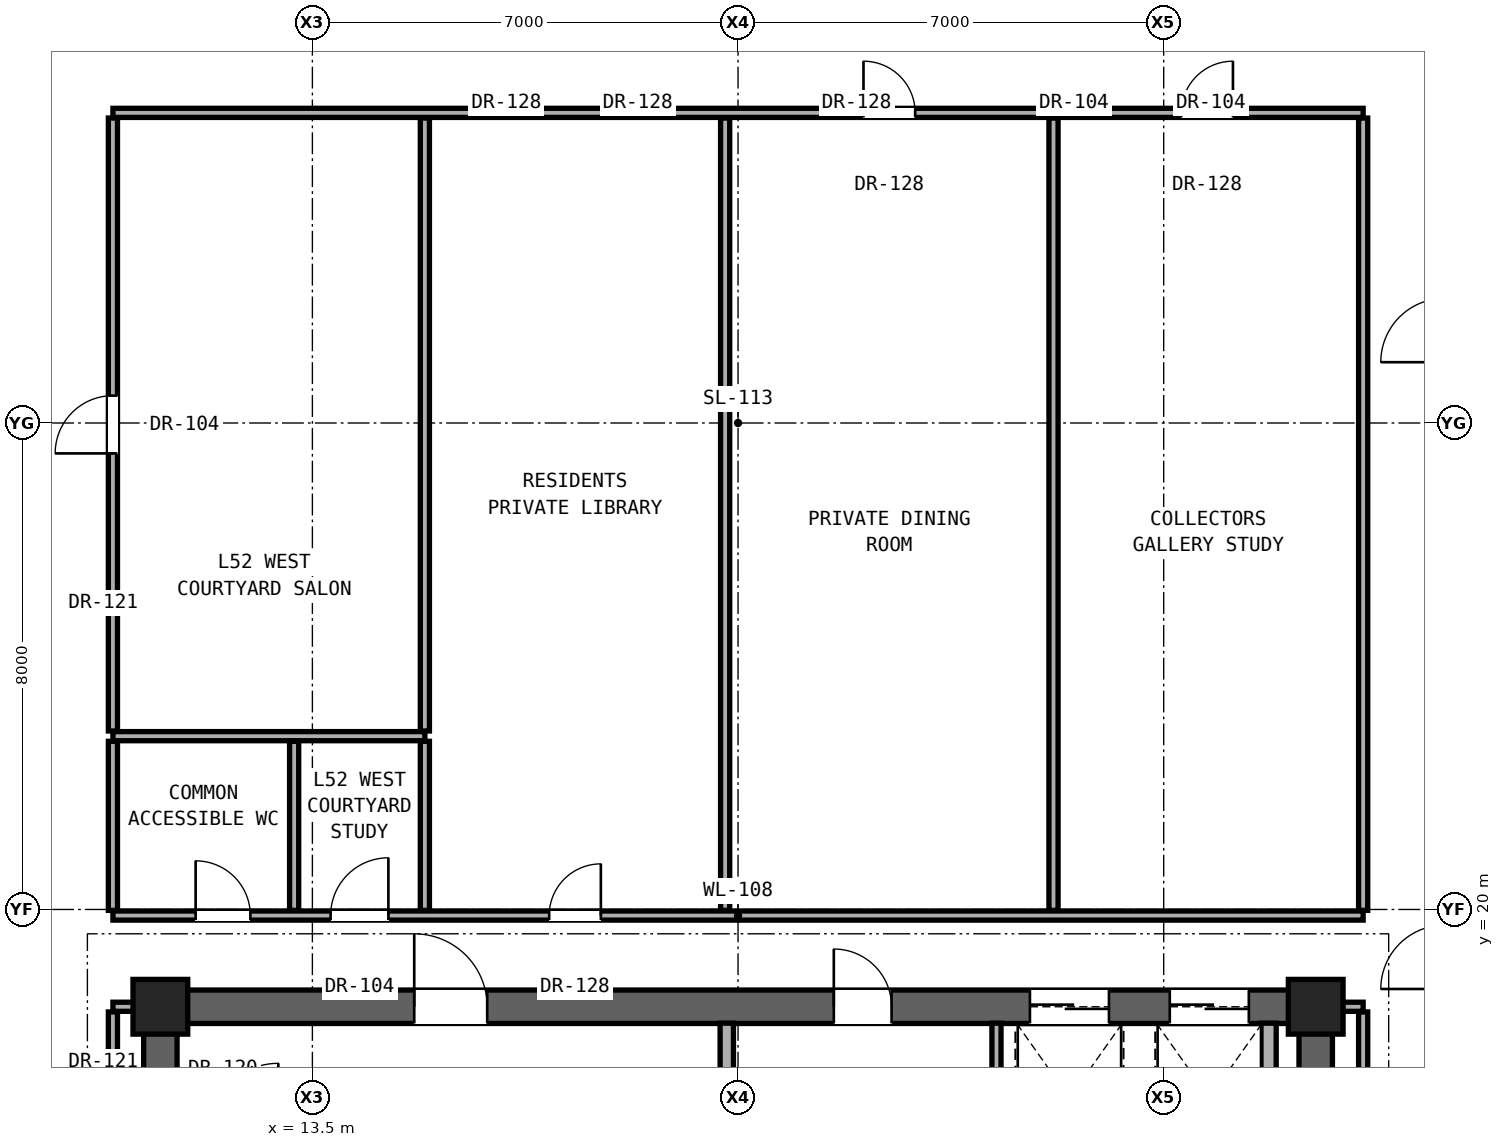
"""IFC4 building model, lengths in metres.
Left out: names, types, materials, properties, quantities, classifications, styles, units other than length and angle.
Written with IfcOpenShell. Run it as: python <this file> out.ifc"""

import sys

from ifc_helpers import new_model, si_unit, direction, frame, frame_2d, origin, origin_2d, place, context, subcontext, project, spatial, rectangle, extrude, element, fill, save


model = new_model("IFC4")
c1 = context("Model", 3, precision=1e-05, world=origin(), true_north=direction((0.0, 1.0)))
c2 = subcontext(c1, "Body", "Model", "MODEL_VIEW")
j1 = project(units=[si_unit("LENGTHUNIT", "METRE"), si_unit("PLANEANGLEUNIT", "RADIAN")], contexts=[c1])
p1 = place(None, origin())
s1 = spatial("IfcSite", under=j1, at=p1, CompositionType="ELEMENT")
p2 = place(p1, origin())
s2 = spatial("IfcBuilding", under=s1, at=p2, CompositionType="ELEMENT")
p3 = place(p2, frame((0.0, 0.0, 183.65)))
s3 = spatial("IfcBuildingStorey", under=s2, at=p3, CompositionType="ELEMENT", Elevation=183.65)
for number, where, z_axis, x_axis in (
    (1, (11.0, 18.4, 0.0), (0.0, 0.0, 1.0), (1.0, 0.0, 0.0)),
    (2, (30.0, 18.4, 0.0), (0.0, 0.0, 1.0), (1.0, 0.0, 0.0)),
):
    element("IfcColumn", number, at=place(p3, frame(where, z_axis=z_axis, x_axis=x_axis)), inside=s3, PredefinedType="COLUMN", context=c2, shape_type="SweptSolid", body=[
        extrude(rectangle(XDim=0.9, YDim=0.9, at=origin_2d()), origin(), (0.0, 0.0, 1.0), 3.25),
    ])
for number, where, z_axis, x_axis in (
    (3, (11.0, 12.4, 0.0), (0.0, 0.0, 1.0), (0.0, 1.0, 0.0)),
    (4, (30.0, 12.4, 0.0), (0.0, 0.0, 1.0), (0.0, 1.0, 0.0)),
):
    element("IfcWall", number, at=place(p3, frame(where, z_axis=z_axis, x_axis=x_axis)), inside=s3, PredefinedType="SHEAR", context=c2, shape_type="SweptSolid", body=[
        extrude(rectangle(XDim=6.0, YDim=0.55, at=frame_2d((3.0, 0.0))), origin(), (0.0, 0.0, 1.0), 3.05),
    ])
p4 = place(p3, frame((11.0, 18.4, 0.0), z_axis=(0.0, 0.0, 1.0), x_axis=(1.0, 0.0, 0.0)))
e5 = element("IfcWall", 5, at=p4, inside=s3, PredefinedType="SHEAR", context=c2, shape_type="SweptSolid", body=[
    extrude(rectangle(XDim=19.0, YDim=0.55, at=frame_2d((9.5, 0.0))), origin(), (0.0, 0.0, 1.0), 3.05),
])
p5 = place(p4, frame((4.175, 0.0, 0.0)))
e6 = element("IfcOpeningElement", 6, at=p5, cuts=e5, PredefinedType="OPENING", context=c2, shape_type="SweptSolid", body=[
    extrude(rectangle(XDim=1.2, YDim=2.25, at=frame_2d((0.6, 1.125))), frame((0.0, 0.285, 0.0), z_axis=(0.0, -1.0, 0.0), x_axis=(1.0, 0.0, 0.0)), (0.0, 0.0, 1.0), 0.57),
])
p6 = place(p4, frame((11.075, 0.0, 0.0)))
e7 = element("IfcOpeningElement", 7, at=p6, cuts=e5, PredefinedType="OPENING", context=c2, shape_type="SweptSolid", body=[
    extrude(rectangle(XDim=0.95, YDim=2.15, at=frame_2d((0.475, 1.075))), frame((0.0, 0.285, 0.0), z_axis=(0.0, -1.0, 0.0), x_axis=(1.0, 0.0, 0.0)), (0.0, 0.0, 1.0), 0.57),
])
p7 = place(p4, frame((14.3, 0.0, 0.0)))
e8 = element("IfcOpeningElement", 8, at=p7, cuts=e5, PredefinedType="OPENING", context=c2, shape_type="SweptSolid", body=[
    extrude(rectangle(XDim=1.3, YDim=2.3, at=frame_2d((0.65, 1.15))), frame((0.0, 0.285, 0.0), z_axis=(0.0, -1.0, 0.0), x_axis=(1.0, 0.0, 0.0)), (0.0, 0.0, 1.0), 0.57),
])
p8 = place(p4, frame((16.6, 0.0, 0.0)))
e9 = element("IfcOpeningElement", 9, at=p8, cuts=e5, PredefinedType="OPENING", context=c2, shape_type="SweptSolid", body=[
    extrude(rectangle(XDim=1.3, YDim=2.3, at=frame_2d((0.65, 1.15))), frame((0.0, 0.285, 0.0), z_axis=(0.0, -1.0, 0.0), x_axis=(1.0, 0.0, 0.0)), (0.0, 0.0, 1.0), 0.57),
])
for number, where, z_axis, x_axis in (
    (10, (10.22, 18.4, 0.0), (0.0, 0.0, 1.0), (1.0, 0.0, 0.0)),
    (11, (30.27, 18.4, 0.0), (0.0, 0.0, 1.0), (1.0, 0.0, 0.0)),
):
    element("IfcWall", number, at=place(p3, frame(where, z_axis=z_axis, x_axis=x_axis)), inside=s3, PredefinedType="PARTITIONING", context=c2, shape_type="SweptSolid", body=[
        extrude(rectangle(XDim=0.51, YDim=0.15, at=frame_2d((0.255, 0.0))), origin(), (0.0, 0.0, 1.0), 2.442),
    ])
p9 = place(p3, frame((10.22, 19.9, 0.0), z_axis=(0.0, 0.0, 1.0), x_axis=(1.0, 0.0, 0.0)))
e12 = element("IfcWall", 12, at=p9, inside=s3, PredefinedType="PARTITIONING", context=c2, shape_type="SweptSolid", body=[
    extrude(rectangle(XDim=20.56, YDim=0.15, at=frame_2d((10.28, 0.0))), origin(), (0.0, 0.0, 1.0), 2.186),
])
p10 = place(p9, frame((1.36, 0.0, 0.0)))
e13 = element("IfcOpeningElement", 13, at=p10, cuts=e12, PredefinedType="OPENING", context=c2, shape_type="SweptSolid", body=[
    extrude(rectangle(XDim=0.9, YDim=2.1, at=frame_2d((0.45, 1.05))), frame((0.0, 0.085, 0.0), z_axis=(0.0, -1.0, 0.0), x_axis=(1.0, 0.0, 0.0)), (0.0, 0.0, 1.0), 0.17),
])
p11 = place(p9, frame((3.58, 0.0, 0.0)))
e14 = element("IfcOpeningElement", 14, at=p11, cuts=e12, PredefinedType="OPENING", context=c2, shape_type="SweptSolid", body=[
    extrude(rectangle(XDim=0.95, YDim=2.15, at=frame_2d((0.475, 1.075))), frame((0.0, 0.085, 0.0), z_axis=(0.0, -1.0, 0.0), x_axis=(1.0, 0.0, 0.0)), (0.0, 0.0, 1.0), 0.17),
])
p12 = place(p9, frame((7.174, 0.0, 0.0)))
e15 = element("IfcOpeningElement", 15, at=p12, cuts=e12, PredefinedType="OPENING", context=c2, shape_type="SweptSolid", body=[
    extrude(rectangle(XDim=0.85, YDim=2.01, at=frame_2d((0.425, 1.005))), frame((0.0, 0.085, 0.0), z_axis=(0.0, -1.0, 0.0), x_axis=(1.0, 0.0, 0.0)), (0.0, 0.0, 1.0), 0.17),
])
p13 = place(p3, frame((10.22, 22.85, 0.0), z_axis=(0.0, 0.0, 1.0), x_axis=(1.0, 0.0, 0.0)))
e16 = element("IfcWall", 16, at=p13, inside=s3, PredefinedType="PARTITIONING", context=c2, shape_type="SweptSolid", body=[
    extrude(rectangle(XDim=5.13, YDim=0.15, at=frame_2d((2.565, 0.0))), origin(), (0.0, 0.0, 1.0), 2.186),
])
p14 = place(p3, frame((10.22, 33.1, 0.0), z_axis=(0.0, 0.0, 1.0), x_axis=(1.0, 0.0, 0.0)))
e17 = element("IfcWall", 17, at=p14, inside=s3, PredefinedType="PARTITIONING", context=c2, shape_type="SweptSolid", body=[
    extrude(rectangle(XDim=20.56, YDim=0.15, at=frame_2d((10.28, 0.0))), origin(), (0.0, 0.0, 1.0), 2.186),
])
p15 = place(p14, frame((12.343, 0.0, 0.0)))
e18 = element("IfcOpeningElement", 18, at=p15, cuts=e17, PredefinedType="OPENING", context=c2, shape_type="SweptSolid", body=[
    extrude(rectangle(XDim=0.85, YDim=2.01, at=frame_2d((0.425, 1.005))), frame((0.0, 0.085, 0.0), z_axis=(0.0, -1.0, 0.0), x_axis=(1.0, 0.0, 0.0)), (0.0, 0.0, 1.0), 0.17),
])
p16 = place(p14, frame((17.569, 0.0, 0.0)))
e19 = element("IfcOpeningElement", 19, at=p16, cuts=e17, PredefinedType="OPENING", context=c2, shape_type="SweptSolid", body=[
    extrude(rectangle(XDim=0.85, YDim=2.01, at=frame_2d((0.425, 1.005))), frame((0.0, 0.085, 0.0), z_axis=(0.0, -1.0, 0.0), x_axis=(1.0, 0.0, 0.0)), (0.0, 0.0, 1.0), 0.17),
])
p17 = place(p3, frame((10.22, 12.335, 0.0), z_axis=(0.0, 0.0, 1.0), x_axis=(0.0, 1.0, 0.0)))
e20 = element("IfcWall", 20, at=p17, inside=s3, PredefinedType="PARTITIONING", context=c2, shape_type="SweptSolid", body=[
    extrude(rectangle(XDim=5.98, YDim=0.15, at=frame_2d((2.99, 0.0))), origin(), (0.0, 0.0, 1.0), 2.442),
])
p18 = place(p3, frame((10.22, 19.985, 0.0), z_axis=(0.0, 0.0, 1.0), x_axis=(0.0, 1.0, 0.0)))
e21 = element("IfcWall", 21, at=p18, inside=s3, PredefinedType="PARTITIONING", context=c2, shape_type="SweptSolid", body=[
    extrude(rectangle(XDim=2.78, YDim=0.15, at=frame_2d((1.39, 0.0))), origin(), (0.0, 0.0, 1.0), 3.05),
])
p19 = place(p3, frame((10.22, 22.935, 0.0), z_axis=(0.0, 0.0, 1.0), x_axis=(0.0, 1.0, 0.0)))
e22 = element("IfcWall", 22, at=p19, inside=s3, PredefinedType="PARTITIONING", context=c2, shape_type="SweptSolid", body=[
    extrude(rectangle(XDim=10.08, YDim=0.15, at=frame_2d((5.04, 0.0))), origin(), (0.0, 0.0, 1.0), 2.346),
])
p20 = place(p19, frame((4.565, 0.0, 0.0)))
e23 = element("IfcOpeningElement", 23, at=p20, cuts=e22, PredefinedType="OPENING", context=c2, shape_type="SweptSolid", body=[
    extrude(rectangle(XDim=0.95, YDim=2.15, at=frame_2d((0.475, 1.075))), frame((0.0, 0.085, 0.0), z_axis=(0.0, -1.0, 0.0), x_axis=(1.0, 0.0, 0.0)), (0.0, 0.0, 1.0), 0.17),
])
for number, where, z_axis, x_axis in (
    (24, (13.2, 19.985, 0.0), (0.0, 0.0, 1.0), (0.0, 1.0, 0.0)),
    (25, (15.35, 19.985, 0.0), (0.0, 0.0, 1.0), (0.0, 1.0, 0.0)),
):
    element("IfcWall", number, at=place(p3, frame(where, z_axis=z_axis, x_axis=x_axis)), inside=s3, PredefinedType="PARTITIONING", context=c2, shape_type="SweptSolid", body=[
        extrude(rectangle(XDim=2.78, YDim=0.15, at=frame_2d((1.39, 0.0))), origin(), (0.0, 0.0, 1.0), 3.05),
    ])
p21 = place(p3, frame((15.35, 22.935, 0.0), z_axis=(0.0, 0.0, 1.0), x_axis=(0.0, 1.0, 0.0)))
e26 = element("IfcWall", 26, at=p21, inside=s3, PredefinedType="PARTITIONING", context=c2, shape_type="SweptSolid", body=[
    extrude(rectangle(XDim=10.08, YDim=0.15, at=frame_2d((5.04, 0.0))), origin(), (0.0, 0.0, 1.0), 2.186),
])
p22 = place(p3, frame((20.315, 16.555, 0.0), z_axis=(0.0, 0.0, 1.0), x_axis=(0.0, 1.0, 0.0)))
e27 = element("IfcWall", 27, at=p22, inside=s3, PredefinedType="SOLIDWALL", context=c2, shape_type="SweptSolid", body=[
    extrude(rectangle(XDim=1.575, YDim=0.22, at=frame_2d((0.788, 0.0))), origin(), (0.0, 0.0, 1.0), 3.05),
])
p23 = place(p3, frame((20.288, 19.985, 0.0), z_axis=(0.0, 0.0, 1.0), x_axis=(0.0, 1.0, 0.0)))
e28 = element("IfcWall", 28, at=p23, inside=s3, PredefinedType="PARTITIONING", context=c2, shape_type="SweptSolid", body=[
    extrude(rectangle(XDim=13.03, YDim=0.15, at=frame_2d((6.515, 0.0))), origin(), (0.0, 0.0, 1.0), 2.186),
])
p24 = place(p3, frame((24.75, 15.573, 0.0), z_axis=(0.0, 0.0, 1.0), x_axis=(0.0, 1.0, 0.0)))
e29 = element("IfcWall", 29, at=p24, inside=s3, PredefinedType="PARTITIONING", context=c2, shape_type="SweptSolid", body=[
    extrude(rectangle(XDim=2.557, YDim=0.15, at=frame_2d((1.279, 0.0))), origin(), (0.0, 0.0, 1.0), 3.05),
])
p25 = place(p3, frame((25.688, 19.985, 0.0), z_axis=(0.0, 0.0, 1.0), x_axis=(0.0, 1.0, 0.0)))
e30 = element("IfcWall", 30, at=p25, inside=s3, PredefinedType="PARTITIONING", context=c2, shape_type="SweptSolid", body=[
    extrude(rectangle(XDim=13.03, YDim=0.15, at=frame_2d((6.515, 0.0))), origin(), (0.0, 0.0, 1.0), 2.186),
])
p26 = place(p3, frame((29.225, 15.573, 0.0), z_axis=(0.0, 0.0, 1.0), x_axis=(0.0, 1.0, 0.0)))
e31 = element("IfcWall", 31, at=p26, inside=s3, PredefinedType="SOLIDWALL", context=c2, shape_type="SweptSolid", body=[
    extrude(rectangle(XDim=2.557, YDim=0.25, at=frame_2d((1.279, 0.0))), origin(), (0.0, 0.0, 1.0), 3.05),
])
p27 = place(p3, frame((30.78, 12.335, 0.0), z_axis=(0.0, 0.0, 1.0), x_axis=(0.0, 1.0, 0.0)))
e32 = element("IfcWall", 32, at=p27, inside=s3, PredefinedType="PARTITIONING", context=c2, shape_type="SweptSolid", body=[
    extrude(rectangle(XDim=5.98, YDim=0.15, at=frame_2d((2.99, 0.0))), origin(), (0.0, 0.0, 1.0), 2.442),
])
p28 = place(p3, frame((30.78, 19.985, 0.0), z_axis=(0.0, 0.0, 1.0), x_axis=(0.0, 1.0, 0.0)))
e33 = element("IfcWall", 33, at=p28, inside=s3, PredefinedType="PARTITIONING", context=c2, shape_type="SweptSolid", body=[
    extrude(rectangle(XDim=13.03, YDim=0.15, at=frame_2d((6.515, 0.0))), origin(), (0.0, 0.0, 1.0), 2.346),
])
p29 = place(p5, origin())
e34 = element("IfcDoor", 34, at=p29, inside=s3, OperationType="SINGLE_SWING_LEFT", PredefinedType="DOOR", context=c2, shape_type="SweptSolid", body=[
    extrude(rectangle(XDim=1.2, YDim=2.25, at=frame_2d((0.6, 1.125))), frame((0.0, 0.025, 0.0), z_axis=(0.0, -1.0, 0.0), x_axis=(1.0, 0.0, 0.0)), (0.0, 0.0, 1.0), 0.05),
])
fill(e6, e34)
p30 = place(p6, origin())
e35 = element("IfcDoor", 35, at=p30, inside=s3, OperationType="SINGLE_SWING_LEFT", PredefinedType="DOOR", context=c2, shape_type="SweptSolid", body=[
    extrude(rectangle(XDim=0.95, YDim=2.15, at=frame_2d((0.475, 1.075))), frame((0.0, 0.025, 0.0), z_axis=(0.0, -1.0, 0.0), x_axis=(1.0, 0.0, 0.0)), (0.0, 0.0, 1.0), 0.05),
])
fill(e7, e35)
p31 = place(p10, origin())
e36 = element("IfcDoor", 36, at=p31, inside=s3, OperationType="SINGLE_SWING_LEFT", PredefinedType="DOOR", context=c2, shape_type="SweptSolid", body=[
    extrude(rectangle(XDim=0.9, YDim=2.1, at=frame_2d((0.45, 1.05))), frame((0.0, 0.025, 0.0), z_axis=(0.0, -1.0, 0.0), x_axis=(1.0, 0.0, 0.0)), (0.0, 0.0, 1.0), 0.05),
])
fill(e13, e36)
p32 = place(p11, origin())
e37 = element("IfcDoor", 37, at=p32, inside=s3, OperationType="SINGLE_SWING_RIGHT", PredefinedType="DOOR", context=c2, shape_type="SweptSolid", body=[
    extrude(rectangle(XDim=0.95, YDim=2.15, at=frame_2d((0.475, 1.075))), frame((0.0, 0.025, 0.0), z_axis=(0.0, -1.0, 0.0), x_axis=(1.0, 0.0, 0.0)), (0.0, 0.0, 1.0), 0.05),
])
fill(e14, e37)
p33 = place(p20, origin())
e38 = element("IfcDoor", 38, at=p33, inside=s3, OperationType="SINGLE_SWING_LEFT", PredefinedType="DOOR", context=c2, shape_type="SweptSolid", body=[
    extrude(rectangle(XDim=0.95, YDim=2.15, at=frame_2d((0.475, 1.075))), frame((0.0, 0.025, 0.0), z_axis=(0.0, -1.0, 0.0), x_axis=(1.0, 0.0, 0.0)), (0.0, 0.0, 1.0), 0.05),
])
fill(e23, e38)
p34 = place(p12, origin())
e39 = element("IfcDoor", 39, at=p34, inside=s3, OperationType="SINGLE_SWING_RIGHT", PredefinedType="DOOR", context=c2, shape_type="SweptSolid", body=[
    extrude(rectangle(XDim=0.85, YDim=2.01, at=frame_2d((0.425, 1.005))), frame((0.0, 0.025, 0.0), z_axis=(0.0, -1.0, 0.0), x_axis=(1.0, 0.0, 0.0)), (0.0, 0.0, 1.0), 0.05),
])
fill(e15, e39)
p35 = place(p15, origin())
e40 = element("IfcDoor", 40, at=p35, inside=s3, OperationType="SINGLE_SWING_LEFT", PredefinedType="DOOR", context=c2, shape_type="SweptSolid", body=[
    extrude(rectangle(XDim=0.85, YDim=2.01, at=frame_2d((0.425, 1.005))), frame((0.0, 0.025, 0.0), z_axis=(0.0, -1.0, 0.0), x_axis=(1.0, 0.0, 0.0)), (0.0, 0.0, 1.0), 0.05),
])
fill(e18, e40)
p36 = place(p16, origin())
e41 = element("IfcDoor", 41, at=p36, inside=s3, OperationType="SINGLE_SWING_RIGHT", PredefinedType="DOOR", context=c2, shape_type="SweptSolid", body=[
    extrude(rectangle(XDim=0.85, YDim=2.01, at=frame_2d((0.425, 1.005))), frame((0.0, 0.025, 0.0), z_axis=(0.0, -1.0, 0.0), x_axis=(1.0, 0.0, 0.0)), (0.0, 0.0, 1.0), 0.05),
])
fill(e19, e41)
p37 = place(p7, origin())
e42 = element("IfcDoor", 42, at=p37, inside=s3, OperationType="DOUBLE_DOOR_SLIDING", PredefinedType="DOOR", context=c2, shape_type="SweptSolid", body=[
    extrude(rectangle(XDim=1.3, YDim=2.3, at=frame_2d((0.65, 1.15))), frame((0.0, 0.025, 0.0), z_axis=(0.0, -1.0, 0.0), x_axis=(1.0, 0.0, 0.0)), (0.0, 0.0, 1.0), 0.05),
])
fill(e8, e42)
p38 = place(p8, origin())
e43 = element("IfcDoor", 43, at=p38, inside=s3, OperationType="DOUBLE_DOOR_SLIDING", PredefinedType="DOOR", context=c2, shape_type="SweptSolid", body=[
    extrude(rectangle(XDim=1.3, YDim=2.3, at=frame_2d((0.65, 1.15))), frame((0.0, 0.025, 0.0), z_axis=(0.0, -1.0, 0.0), x_axis=(1.0, 0.0, 0.0)), (0.0, 0.0, 1.0), 0.05),
])
fill(e9, e43)
save(model, sys.argv[1])
